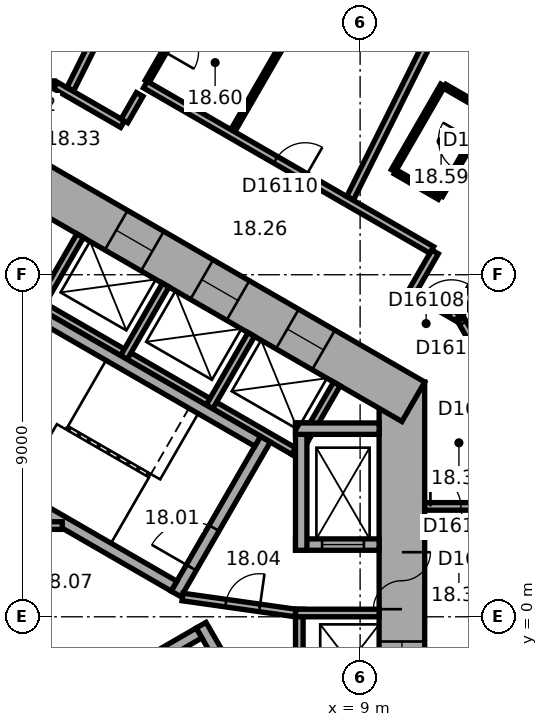
"""IFC4 building model, lengths in metres.
Left out: names, types, materials, properties, quantities, classifications, styles, units other than length and angle.
Written with IfcOpenShell. Run it as: python <this file> out.ifc"""

import sys

from ifc_helpers import new_model, si_unit, direction, frame, frame_2d, origin, place, context, subcontext, project, spatial, rectangle, extrude, element, fill, save


model = new_model("IFC4")
c1 = context("Model", 3, precision=1e-05, world=origin(), true_north=direction((0.0, 1.0)))
c2 = subcontext(c1, "Body", "Model", "MODEL_VIEW")
j1 = project(units=[si_unit("LENGTHUNIT", "METRE"), si_unit("PLANEANGLEUNIT", "RADIAN")], contexts=[c1])
p1 = place(None, origin())
s1 = spatial("IfcSite", under=j1, at=p1, CompositionType="ELEMENT")
p2 = place(p1, origin())
s2 = spatial("IfcBuilding", under=s1, at=p2, CompositionType="ELEMENT")
p3 = place(p2, frame((0.0, 0.0, 83.6)))
s3 = spatial("IfcBuildingStorey", under=s2, at=p3, CompositionType="ELEMENT", Elevation=83.6)
p4 = place(p3, frame((10.1, -6.177, 0.0), z_axis=(0.0, 0.0, 1.0), x_axis=(0.0, 1.0, 0.0)))
e1 = element("IfcWall", 1, at=p4, inside=s3, PredefinedType="SHEAR", context=c2, shape_type="SweptSolid", body=[
    extrude(rectangle(XDim=12.355, YDim=1.2, at=frame_2d((6.177, 0.0))), origin(), (0.0, 0.0, 1.0), 3.3),
])
p5 = place(p4, frame((6.378, 0.0, 0.0)))
e2 = element("IfcOpeningElement", 2, at=p5, cuts=e1, PredefinedType="OPENING", context=c2, shape_type="SweptSolid", body=[
    extrude(rectangle(XDim=1.5, YDim=2.1, at=frame_2d((0.75, 1.05))), frame((0.0, 0.61, 0.0), z_axis=(0.0, -1.0, 0.0), x_axis=(1.0, 0.0, 0.0)), (0.0, 0.0, 1.0), 1.22),
])
p6 = place(p4, frame((1.828, 0.0, 0.0)))
e3 = element("IfcOpeningElement", 3, at=p6, cuts=e1, PredefinedType="OPENING", context=c2, shape_type="SweptSolid", body=[
    extrude(rectangle(XDim=1.1, YDim=2.1, at=frame_2d((0.55, 1.05))), frame((0.0, 0.61, 0.0), z_axis=(0.0, -1.0, 0.0), x_axis=(1.0, 0.0, 0.0)), (0.0, 0.0, 1.0), 1.22),
])
p7 = place(p4, frame((4.427, 0.0, 0.0)))
e4 = element("IfcOpeningElement", 4, at=p7, cuts=e1, PredefinedType="OPENING", context=c2, shape_type="SweptSolid", body=[
    extrude(rectangle(XDim=1.1, YDim=2.1, at=frame_2d((0.55, 1.05))), frame((0.0, 0.61, 0.0), z_axis=(0.0, -1.0, 0.0), x_axis=(1.0, 0.0, 0.0)), (0.0, 0.0, 1.0), 1.22),
])
p8 = place(p3, frame((10.4, 5.658, 0.0), z_axis=(0.0, 0.0, 1.0), x_axis=(-0.866021384402, 0.500006961711, 0.0)))
e5 = element("IfcWall", 5, at=p8, inside=s3, PredefinedType="SHEAR", context=c2, shape_type="SweptSolid", body=[
    extrude(rectangle(XDim=12.355, YDim=1.2, at=frame_2d((6.178, 0.0))), origin(), (0.0, 0.0, 1.0), 3.3),
])
p9 = place(p8, frame((2.728, 0.0, 0.0)))
e6 = element("IfcOpeningElement", 6, at=p9, cuts=e5, PredefinedType="OPENING", context=c2, shape_type="SweptSolid", body=[
    extrude(rectangle(XDim=1.1, YDim=2.1, at=frame_2d((0.55, 1.05))), frame((0.0, 0.61, 0.0), z_axis=(0.0, -1.0, 0.0), x_axis=(1.0, 0.0, 0.0)), (0.0, 0.0, 1.0), 1.22),
])
p10 = place(p8, frame((5.328, 0.0, 0.0)))
e7 = element("IfcOpeningElement", 7, at=p10, cuts=e5, PredefinedType="OPENING", context=c2, shape_type="SweptSolid", body=[
    extrude(rectangle(XDim=1.1, YDim=2.1, at=frame_2d((0.55, 1.05))), frame((0.0, 0.61, 0.0), z_axis=(0.0, -1.0, 0.0), x_axis=(1.0, 0.0, 0.0)), (0.0, 0.0, 1.0), 1.22),
])
p11 = place(p8, frame((7.928, 0.0, 0.0)))
e8 = element("IfcOpeningElement", 8, at=p11, cuts=e5, PredefinedType="OPENING", context=c2, shape_type="SweptSolid", body=[
    extrude(rectangle(XDim=1.1, YDim=2.1, at=frame_2d((0.55, 1.05))), frame((0.0, 0.61, 0.0), z_axis=(0.0, -1.0, 0.0), x_axis=(1.0, 0.0, 0.0)), (0.0, 0.0, 1.0), 1.22),
])
p12 = place(p3, frame((7.4, -5.2, 0.0), z_axis=(0.0, 0.0, 1.0), x_axis=(0.0, 1.0, 0.0)))
e9 = element("IfcWall", 9, at=p12, inside=s3, PredefinedType="PARTITIONING", context=c2, shape_type="SweptSolid", body=[
    extrude(rectangle(XDim=5.4, YDim=0.2, at=frame_2d((2.7, 0.0))), origin(), (0.0, 0.0, 1.0), 3.05),
])
p13 = place(p3, frame((7.3, 0.1, 0.0), z_axis=(0.0, 0.0, 1.0), x_axis=(1.0, 0.0, 0.0)))
e10 = element("IfcWall", 10, at=p13, inside=s3, PredefinedType="PARTITIONING", context=c2, shape_type="SweptSolid", body=[
    extrude(rectangle(XDim=2.2, YDim=0.2, at=frame_2d((1.1, 0.0))), origin(), (0.0, 0.0, 1.0), 3.05),
])
p14 = place(p3, frame((7.424, 4.259, 0.0), z_axis=(0.0, 0.0, 1.0), x_axis=(-0.866026010844, 0.49999894854, 0.0)))
e11 = element("IfcWall", 11, at=p14, inside=s3, PredefinedType="PARTITIONING", context=c2, shape_type="SweptSolid", body=[
    extrude(rectangle(XDim=8.0, YDim=0.2, at=frame_2d((4.0, 0.0))), origin(), (0.0, 0.0, 1.0), 3.05),
])
for number, where, z_axis, x_axis in (
    (12, (7.287, 4.222, 0.0), (0.0, 0.0, 1.0), (0.5, 0.866, 0.0)),
    (13, (5.036, 5.522, 0.0), (0.0, 0.0, 1.0), (0.5, 0.866, 0.0)),
    (14, (2.784, 6.822, 0.0), (0.0, 0.0, 1.0), (0.5, 0.866, 0.0)),
    (15, (0.532, 8.122, 0.0), (0.0, 0.0, 1.0), (0.5, 0.866, 0.0)),
):
    element("IfcWall", number, at=place(p3, frame(where, z_axis=z_axis, x_axis=x_axis)), inside=s3, PredefinedType="PARTITIONING", context=c2, shape_type="SweptSolid", body=[
        extrude(rectangle(XDim=2.2, YDim=0.2, at=frame_2d((1.1, 0.0))), origin(), (0.0, 0.0, 1.0), 3.05),
    ])
p15 = place(p3, frame((4.158, 0.602, 0.0), z_axis=(0.0, 0.0, 1.0), x_axis=(0.499977259774, 0.866038532462, 0.0)))
e16 = element("IfcWall", 16, at=p15, inside=s3, PredefinedType="SHEAR", context=c2, shape_type="SweptSolid", body=[
    extrude(rectangle(XDim=4.7, YDim=0.3, at=frame_2d((2.35, 0.0))), origin(), (0.0, 0.0, 1.0), 3.05),
])
p16 = place(p15, frame((0.8, 0.0, 0.0)))
e17 = element("IfcOpeningElement", 17, at=p16, cuts=e16, PredefinedType="OPENING", context=c2, shape_type="SweptSolid", body=[
    extrude(rectangle(XDim=1.2, YDim=2.1, at=frame_2d((0.6, 1.05))), frame((0.0, 0.16, 0.0), z_axis=(0.0, -1.0, 0.0), x_axis=(1.0, 0.0, 0.0)), (0.0, 0.0, 1.0), 0.32),
])
for number, where, z_axis, x_axis in (
    (18, (4.103, 0.807, 0.0), (0.0, 0.0, 1.0), (-0.866, 0.5, 0.0)),
    (19, (6.303, 4.617, 0.0), (0.0, 0.0, 1.0), (-0.866, 0.5, 0.0)),
):
    element("IfcWall", number, at=place(p3, frame(where, z_axis=z_axis, x_axis=x_axis)), inside=s3, PredefinedType="SHEAR", context=c2, shape_type="SweptSolid", body=[
        extrude(rectangle(XDim=7.06, YDim=0.3, at=frame_2d((3.53, 0.0))), origin(), (0.0, 0.0, 1.0), 3.05),
    ])
p17 = place(p3, frame((4.816, -0.222, 0.0), z_axis=(0.0, 0.0, 1.0), x_axis=(0.499977259774, -0.866038532462, 0.0)))
e20 = element("IfcWall", 20, at=p17, inside=s3, PredefinedType="SHEAR", context=c2, shape_type="SweptSolid", body=[
    extrude(rectangle(XDim=4.7, YDim=0.3, at=frame_2d((2.35, 0.0))), origin(), (0.0, 0.0, 1.0), 3.05),
])
p18 = place(p3, frame((-1.353, -3.957, 0.0), z_axis=(0.0, 0.0, 1.0), x_axis=(0.866027801685, 0.499995846692, 0.0)))
e21 = element("IfcWall", 21, at=p18, inside=s3, PredefinedType="SHEAR", context=c2, shape_type="SweptSolid", body=[
    extrude(rectangle(XDim=7.06, YDim=0.3, at=frame_2d((3.53, 0.0))), origin(), (0.0, 0.0, 1.0), 3.05),
])
p19 = place(p3, frame((7.3, 1.9, 0.0), z_axis=(0.0, 0.0, 1.0), x_axis=(1.0, 0.0, 0.0)))
e22 = element("IfcWall", 22, at=p19, inside=s3, PredefinedType="SHEAR", context=c2, shape_type="SweptSolid", body=[
    extrude(rectangle(XDim=2.2, YDim=0.3, at=frame_2d((1.1, 0.0))), origin(), (0.0, 0.0, 1.0), 3.05),
])
p20 = place(p19, frame((0.7, 0.0, 0.0)))
e23 = element("IfcOpeningElement", 23, at=p20, cuts=e22, PredefinedType="OPENING", context=c2, shape_type="SweptSolid", body=[
    extrude(rectangle(XDim=1.1, YDim=2.1, at=frame_2d((0.55, 1.05))), frame((0.0, 0.16, 0.0), z_axis=(0.0, -1.0, 0.0), x_axis=(1.0, 0.0, 0.0)), (0.0, 0.0, 1.0), 0.32),
])
p21 = place(p3, frame((7.45, 1.75, 0.0), z_axis=(0.0, 0.0, 1.0), x_axis=(0.0, 1.0, 0.0)))
e24 = element("IfcWall", 24, at=p21, inside=s3, PredefinedType="SHEAR", context=c2, shape_type="SweptSolid", body=[
    extrude(rectangle(XDim=3.35, YDim=0.3, at=frame_2d((1.675, 0.0))), origin(), (0.0, 0.0, 1.0), 3.05),
])
p22 = place(p3, frame((7.3, 4.95, 0.0), z_axis=(0.0, 0.0, 1.0), x_axis=(1.0, 0.0, 0.0)))
e25 = element("IfcWall", 25, at=p22, inside=s3, PredefinedType="SHEAR", context=c2, shape_type="SweptSolid", body=[
    extrude(rectangle(XDim=2.2, YDim=0.3, at=frame_2d((1.1, 0.0))), origin(), (0.0, 0.0, 1.0), 3.05),
])
p23 = place(p3, frame((4.327, 0.521, 0.0), z_axis=(0.0, 0.0, 1.0), x_axis=(0.990124376366, -0.14019172346, 0.0)))
e26 = element("IfcWall", 26, at=p23, inside=s3, PredefinedType="PARTITIONING", context=c2, shape_type="SweptSolid", body=[
    extrude(rectangle(XDim=3.002, YDim=0.2, at=frame_2d((1.501, 0.0))), origin(), (0.0, 0.0, 1.0), 3.05),
])
p24 = place(p23, frame((1.15, 0.0, 0.0)))
e27 = element("IfcOpeningElement", 27, at=p24, cuts=e26, PredefinedType="OPENING", context=c2, shape_type="SweptSolid", body=[
    extrude(rectangle(XDim=0.9, YDim=2.1, at=frame_2d((0.45, 1.05))), frame((0.0, 0.11, 0.0), z_axis=(0.0, -1.0, 0.0), x_axis=(1.0, 0.0, 0.0)), (0.0, 0.0, 1.0), 0.22),
])
p25 = place(p3, frame((-2.72, 2.4, 0.0), z_axis=(0.0, 0.0, 1.0), x_axis=(1.0, 0.0, 0.0)))
e28 = element("IfcWall", 28, at=p25, inside=s3, PredefinedType="PARTITIONING", context=c2, shape_type="SweptSolid", body=[
    extrude(rectangle(XDim=3.883, YDim=0.2, at=frame_2d((1.941, 0.0))), origin(), (0.0, 0.0, 1.0), 3.05),
])
p26 = place(p3, frame((0.95, 14.001, 0.0), z_axis=(0.0, 0.0, 1.0), x_axis=(-1.0, 0.0, 0.0)))
e29 = element("IfcWall", 29, at=p26, inside=s3, PredefinedType="PARTITIONING", context=c2, shape_type="SweptSolid", body=[
    extrude(rectangle(XDim=1.86, YDim=0.2, at=frame_2d((0.93, 0.0))), origin(), (0.0, 0.0, 1.0), 3.05),
])
p27 = place(p26, frame((0.48, 0.0, 0.0)))
e30 = element("IfcOpeningElement", 30, at=p27, cuts=e29, PredefinedType="OPENING", context=c2, shape_type="SweptSolid", body=[
    extrude(rectangle(XDim=0.9, YDim=2.1, at=frame_2d((0.45, 1.05))), frame((0.0, 0.11, 0.0), z_axis=(0.0, -1.0, 0.0), x_axis=(1.0, 0.0, 0.0)), (0.0, 0.0, 1.0), 0.22),
])
p28 = place(p3, frame((2.748, 12.962, 0.0), z_axis=(0.0, 0.0, 1.0), x_axis=(-0.866013897511, 0.50001992892, 0.0)))
e31 = element("IfcWall", 31, at=p28, inside=s3, PredefinedType="PARTITIONING", context=c2, shape_type="SweptSolid", body=[
    extrude(rectangle(XDim=2.037, YDim=0.2, at=frame_2d((1.018, 0.0))), origin(), (0.0, 0.0, 1.0), 3.05),
])
p29 = place(p3, frame((3.199, 13.743, 0.0), z_axis=(0.0, 0.0, 1.0), x_axis=(-0.500170954823, -0.865926680471, 0.0)))
e32 = element("IfcWall", 32, at=p29, inside=s3, PredefinedType="PARTITIONING", context=c2, shape_type="SweptSolid", body=[
    extrude(rectangle(XDim=0.801, YDim=0.2, at=frame_2d((0.4, 0.0))), origin(), (0.0, 0.0, 1.0), 3.05),
])
p30 = place(p3, frame((3.399, 14.089, 0.0), z_axis=(0.0, 0.0, 1.0), x_axis=(0.4999416173, 0.866059108428, 0.0)))
e33 = element("IfcWall", 33, at=p30, inside=s3, PredefinedType="PARTITIONING", context=c2, shape_type="SweptSolid", body=[
    extrude(rectangle(XDim=2.7, YDim=0.12, at=frame_2d((1.35, 0.0))), origin(), (0.0, 0.0, 1.0), 3.05),
])
p31 = place(p30, frame((0.9, 0.0, 0.0)))
e34 = element("IfcOpeningElement", 34, at=p31, cuts=e33, PredefinedType="OPENING", context=c2, shape_type="SweptSolid", body=[
    extrude(rectangle(XDim=0.9, YDim=2.1, at=frame_2d((0.45, 1.05))), frame((0.0, 0.07, 0.0), z_axis=(0.0, -1.0, 0.0), x_axis=(1.0, 0.0, 0.0)), (0.0, 0.0, 1.0), 0.14),
])
p32 = place(p3, frame((5.351, 21.859, 0.0), z_axis=(0.0, 0.0, 1.0), x_axis=(-0.446205309328, -0.894930624086, 0.0)))
e35 = element("IfcWall", 35, at=p32, inside=s3, PredefinedType="PARTITIONING", context=c2, shape_type="SweptSolid", body=[
    extrude(rectangle(XDim=8.913, YDim=0.2, at=frame_2d((4.457, 0.0))), origin(), (0.0, 0.0, 1.0), 2.6),
])
p33 = place(p3, frame((6.971, 15.075, 0.0), z_axis=(0.0, 0.0, 1.0), x_axis=(-0.500007957085, -0.86602080971, 0.0)))
e36 = element("IfcWall", 36, at=p33, inside=s3, PredefinedType="PARTITIONING", context=c2, shape_type="SweptSolid", body=[
    extrude(rectangle(XDim=2.64, YDim=0.12, at=frame_2d((1.32, 0.0))), origin(), (0.0, 0.0, 1.0), 3.05),
])
p34 = place(p3, frame((9.875, 11.736, 0.0), z_axis=(0.0, 0.0, 1.0), x_axis=(0.499936506574, 0.866062058628, 0.0)))
e37 = element("IfcWall", 37, at=p34, inside=s3, PredefinedType="PARTITIONING", context=c2, shape_type="SweptSolid", body=[
    extrude(rectangle(XDim=2.6, YDim=0.12, at=frame_2d((1.3, 0.0))), origin(), (0.0, 0.0, 1.0), 3.05),
])
p35 = place(p3, frame((10.371, 8.561, 0.0), z_axis=(0.0, 0.0, 1.0), x_axis=(0.499986357472, 0.866033280158, 0.0)))
e38 = element("IfcWall", 38, at=p35, inside=s3, PredefinedType="PARTITIONING", context=c2, shape_type="SweptSolid", body=[
    extrude(rectangle(XDim=1.201, YDim=0.2, at=frame_2d((0.601, 0.0))), origin(), (0.0, 0.0, 1.0), 3.05),
])
p36 = place(p3, frame((10.885, 9.652, 0.0), z_axis=(0.0, 0.0, 1.0), x_axis=(-0.866033277307, 0.499986362411, 0.0)))
e39 = element("IfcWall", 39, at=p36, inside=s3, PredefinedType="PARTITIONING", context=c2, shape_type="SweptSolid", body=[
    extrude(rectangle(XDim=8.702, YDim=0.2, at=frame_2d((4.351, 0.0))), origin(), (0.0, 0.0, 1.0), 3.05),
])
p37 = place(p36, frame((3.844, 0.0, 0.0)))
e40 = element("IfcOpeningElement", 40, at=p37, cuts=e39, PredefinedType="OPENING", context=c2, shape_type="SweptSolid", body=[
    extrude(rectangle(XDim=0.9, YDim=2.1, at=frame_2d((0.45, 1.05))), frame((0.0, 0.11, 0.0), z_axis=(0.0, -1.0, 0.0), x_axis=(1.0, 0.0, 0.0)), (0.0, 0.0, 1.0), 0.22),
])
for number, where, z_axis, x_axis in (
    (41, (11.087, 11.036, 0.0), (0.0, 0.0, 1.0), (-0.866, 0.5, 0.0)),
    (42, (11.226, 13.958, 0.0), (0.0, 0.0, 1.0), (0.866, -0.5, 0.0)),
):
    element("IfcWall", number, at=place(p3, frame(where, z_axis=z_axis, x_axis=x_axis)), inside=s3, PredefinedType="PARTITIONING", context=c2, shape_type="SweptSolid", body=[
        extrude(rectangle(XDim=1.34, YDim=0.12, at=frame_2d((0.67, 0.0))), origin(), (0.0, 0.0, 1.0), 3.05),
    ])
p38 = place(p3, frame((11.566, 7.871, 0.0), z_axis=(0.0, 0.0, 1.0), x_axis=(-0.866004557827, 0.500036104519, 0.0)))
e43 = element("IfcWall", 43, at=p38, inside=s3, PredefinedType="PARTITIONING", context=c2, shape_type="SweptSolid", body=[
    extrude(rectangle(XDim=1.28, YDim=0.2, at=frame_2d((0.64, 0.0))), origin(), (0.0, 0.0, 1.0), 3.05),
])
p39 = place(p38, frame((0.19, 0.0, 0.0)))
e44 = element("IfcOpeningElement", 44, at=p39, cuts=e43, PredefinedType="OPENING", context=c2, shape_type="SweptSolid", body=[
    extrude(rectangle(XDim=0.9, YDim=2.1, at=frame_2d((0.45, 1.05))), frame((0.0, 0.11, 0.0), z_axis=(0.0, -1.0, 0.0), x_axis=(1.0, 0.0, 0.0)), (0.0, 0.0, 1.0), 0.22),
])
p40 = place(p3, frame((12.357, 13.236, 0.0), z_axis=(0.0, 0.0, 1.0), x_axis=(-0.50000366821, -0.866023285932, 0.0)))
e45 = element("IfcWall", 45, at=p40, inside=s3, PredefinedType="PARTITIONING", context=c2, shape_type="SweptSolid", body=[
    extrude(rectangle(XDim=2.48, YDim=0.12, at=frame_2d((1.24, 0.0))), origin(), (0.0, 0.0, 1.0), 3.05),
])
p41 = place(p40, frame((0.79, 0.0, 0.0)))
e46 = element("IfcOpeningElement", 46, at=p41, cuts=e45, PredefinedType="OPENING", context=c2, shape_type="SweptSolid", body=[
    extrude(rectangle(XDim=0.9, YDim=2.1, at=frame_2d((0.45, 1.05))), frame((0.0, 0.07, 0.0), z_axis=(0.0, -1.0, 0.0), x_axis=(1.0, 0.0, 0.0)), (0.0, 0.0, 1.0), 0.14),
])
p42 = place(p3, frame((12.393, 18.348, 0.0), z_axis=(0.0, 0.0, 1.0), x_axis=(-0.446176022699, -0.894945225569, 0.0)))
e47 = element("IfcWall", 47, at=p42, inside=s3, PredefinedType="PARTITIONING", context=c2, shape_type="SweptSolid", body=[
    extrude(rectangle(XDim=8.191, YDim=0.2, at=frame_2d((4.095, 0.0))), origin(), (0.0, 0.0, 1.0), 2.6),
])
p43 = place(p3, frame((12.58, 6.212, 0.0), z_axis=(0.0, 0.0, 1.0), x_axis=(-0.500063286585, 0.865988862174, 0.0)))
e48 = element("IfcWall", 48, at=p43, inside=s3, PredefinedType="PARTITIONING", context=c2, shape_type="SweptSolid", body=[
    extrude(rectangle(XDim=1.86, YDim=0.2, at=frame_2d((0.93, 0.0))), origin(), (0.0, 0.0, 1.0), 3.05),
])
p44 = place(p43, frame((0.842, 0.0, 0.0)))
e49 = element("IfcOpeningElement", 49, at=p44, cuts=e48, PredefinedType="OPENING", context=c2, shape_type="SweptSolid", body=[
    extrude(rectangle(XDim=0.9, YDim=2.1, at=frame_2d((0.45, 1.05))), frame((0.0, 0.11, 0.0), z_axis=(0.0, -1.0, 0.0), x_axis=(1.0, 0.0, 0.0)), (0.0, 0.0, 1.0), 0.22),
])
p45 = place(p3, frame((15.915, 16.592, 0.0), z_axis=(0.0, 0.0, 1.0), x_axis=(-0.446199736347, -0.894933402709, 0.0)))
e50 = element("IfcWall", 50, at=p45, inside=s3, PredefinedType="PARTITIONING", context=c2, shape_type="SweptSolid", body=[
    extrude(rectangle(XDim=9.635, YDim=0.2, at=frame_2d((4.817, 0.0))), origin(), (0.0, 0.0, 1.0), 3.05),
])
p46 = place(p3, frame((21.95, 2.905, 0.0), z_axis=(0.0, 0.0, 1.0), x_axis=(-1.0, 0.0, 0.0)))
e51 = element("IfcWall", 51, at=p46, inside=s3, PredefinedType="PARTITIONING", context=c2, shape_type="SweptSolid", body=[
    extrude(rectangle(XDim=11.25, YDim=0.2, at=frame_2d((5.625, 0.0))), origin(), (0.0, 0.0, 1.0), 3.05),
])
p47 = place(p46, frame((9.5, 0.0, 0.0)))
e52 = element("IfcOpeningElement", 52, at=p47, cuts=e51, PredefinedType="OPENING", context=c2, shape_type="SweptSolid", body=[
    extrude(rectangle(XDim=1.6, YDim=2.1, at=frame_2d((0.8, 1.05))), frame((0.0, 0.11, 0.0), z_axis=(0.0, -1.0, 0.0), x_axis=(1.0, 0.0, 0.0)), (0.0, 0.0, 1.0), 0.22),
])
p48 = place(p5, origin())
e53 = element("IfcDoor", 53, at=p48, inside=s3, OperationType="DOUBLE_DOOR_SINGLE_SWING", PredefinedType="DOOR", context=c2, shape_type="SweptSolid", body=[
    extrude(rectangle(XDim=1.5, YDim=2.1, at=frame_2d((0.75, 1.05))), frame((0.0, 0.025, 0.0), z_axis=(0.0, -1.0, 0.0), x_axis=(1.0, 0.0, 0.0)), (0.0, 0.0, 1.0), 0.05),
])
fill(e2, e53)
p49 = place(p16, origin())
e54 = element("IfcDoor", 54, at=p49, inside=s3, OperationType="SINGLE_SWING_RIGHT", PredefinedType="DOOR", context=c2, shape_type="SweptSolid", body=[
    extrude(rectangle(XDim=1.2, YDim=2.1, at=frame_2d((0.6, 1.05))), frame((0.0, 0.025, 0.0), z_axis=(0.0, -1.0, 0.0), x_axis=(1.0, 0.0, 0.0)), (0.0, 0.0, 1.0), 0.05),
])
fill(e17, e54)
p50 = place(p24, origin())
e55 = element("IfcDoor", 55, at=p50, inside=s3, OperationType="SINGLE_SWING_LEFT", PredefinedType="DOOR", context=c2, shape_type="SweptSolid", body=[
    extrude(rectangle(XDim=0.9, YDim=2.1, at=frame_2d((0.45, 1.05))), frame((0.0, 0.025, 0.0), z_axis=(0.0, -1.0, 0.0), x_axis=(1.0, 0.0, 0.0)), (0.0, 0.0, 1.0), 0.05),
])
fill(e27, e55)
p51 = place(p20, origin())
e56 = element("IfcDoor", 56, at=p51, inside=s3, OperationType="DOUBLE_DOOR_SLIDING", PredefinedType="DOOR", context=c2, shape_type="SweptSolid", body=[
    extrude(rectangle(XDim=1.1, YDim=2.1, at=frame_2d((0.55, 1.05))), frame((0.0, 0.025, 0.0), z_axis=(0.0, -1.0, 0.0), x_axis=(1.0, 0.0, 0.0)), (0.0, 0.0, 1.0), 0.05),
])
fill(e23, e56)
p52 = place(p7, origin())
e57 = element("IfcDoor", 57, at=p52, inside=s3, OperationType="DOUBLE_DOOR_SLIDING", PredefinedType="DOOR", context=c2, shape_type="SweptSolid", body=[
    extrude(rectangle(XDim=1.1, YDim=2.1, at=frame_2d((0.55, 1.05))), frame((0.0, 0.025, 0.0), z_axis=(0.0, -1.0, 0.0), x_axis=(1.0, 0.0, 0.0)), (0.0, 0.0, 1.0), 0.05),
])
fill(e4, e57)
p53 = place(p9, origin())
e58 = element("IfcDoor", 58, at=p53, inside=s3, OperationType="DOUBLE_DOOR_SLIDING", PredefinedType="DOOR", context=c2, shape_type="SweptSolid", body=[
    extrude(rectangle(XDim=1.1, YDim=2.1, at=frame_2d((0.55, 1.05))), frame((0.0, 0.025, 0.0), z_axis=(0.0, -1.0, 0.0), x_axis=(1.0, 0.0, 0.0)), (0.0, 0.0, 1.0), 0.05),
])
fill(e6, e58)
p54 = place(p10, origin())
e59 = element("IfcDoor", 59, at=p54, inside=s3, OperationType="DOUBLE_DOOR_SLIDING", PredefinedType="DOOR", context=c2, shape_type="SweptSolid", body=[
    extrude(rectangle(XDim=1.1, YDim=2.1, at=frame_2d((0.55, 1.05))), frame((0.0, 0.025, 0.0), z_axis=(0.0, -1.0, 0.0), x_axis=(1.0, 0.0, 0.0)), (0.0, 0.0, 1.0), 0.05),
])
fill(e7, e59)
p55 = place(p11, origin())
e60 = element("IfcDoor", 60, at=p55, inside=s3, OperationType="DOUBLE_DOOR_SLIDING", PredefinedType="DOOR", context=c2, shape_type="SweptSolid", body=[
    extrude(rectangle(XDim=1.1, YDim=2.1, at=frame_2d((0.55, 1.05))), frame((0.0, 0.025, 0.0), z_axis=(0.0, -1.0, 0.0), x_axis=(1.0, 0.0, 0.0)), (0.0, 0.0, 1.0), 0.05),
])
fill(e8, e60)
p56 = place(p44, origin())
e61 = element("IfcDoor", 61, at=p56, inside=s3, OperationType="SINGLE_SWING_LEFT", PredefinedType="DOOR", context=c2, shape_type="SweptSolid", body=[
    extrude(rectangle(XDim=0.9, YDim=2.1, at=frame_2d((0.45, 1.05))), frame((0.0, 0.025, 0.0), z_axis=(0.0, -1.0, 0.0), x_axis=(1.0, 0.0, 0.0)), (0.0, 0.0, 1.0), 0.05),
])
fill(e49, e61)
p57 = place(p39, origin())
e62 = element("IfcDoor", 62, at=p57, inside=s3, OperationType="SINGLE_SWING_LEFT", PredefinedType="DOOR", context=c2, shape_type="SweptSolid", body=[
    extrude(rectangle(XDim=0.9, YDim=2.1, at=frame_2d((0.45, 1.05))), frame((0.0, 0.025, 0.0), z_axis=(0.0, -1.0, 0.0), x_axis=(1.0, 0.0, 0.0)), (0.0, 0.0, 1.0), 0.05),
])
fill(e44, e62)
p58 = place(p41, origin())
e63 = element("IfcDoor", 63, at=p58, inside=s3, OperationType="SINGLE_SWING_LEFT", PredefinedType="DOOR", context=c2, shape_type="SweptSolid", body=[
    extrude(rectangle(XDim=0.9, YDim=2.1, at=frame_2d((0.45, 1.05))), frame((0.0, 0.025, 0.0), z_axis=(0.0, -1.0, 0.0), x_axis=(1.0, 0.0, 0.0)), (0.0, 0.0, 1.0), 0.05),
])
fill(e46, e63)
p59 = place(p37, origin())
e64 = element("IfcDoor", 64, at=p59, inside=s3, OperationType="SINGLE_SWING_LEFT", PredefinedType="DOOR", context=c2, shape_type="SweptSolid", body=[
    extrude(rectangle(XDim=0.9, YDim=2.1, at=frame_2d((0.45, 1.05))), frame((0.0, 0.025, 0.0), z_axis=(0.0, -1.0, 0.0), x_axis=(1.0, 0.0, 0.0)), (0.0, 0.0, 1.0), 0.05),
])
fill(e40, e64)
p60 = place(p31, origin())
e65 = element("IfcDoor", 65, at=p60, inside=s3, OperationType="SINGLE_SWING_LEFT", PredefinedType="DOOR", context=c2, shape_type="SweptSolid", body=[
    extrude(rectangle(XDim=0.9, YDim=2.1, at=frame_2d((0.45, 1.05))), frame((0.0, 0.025, 0.0), z_axis=(0.0, -1.0, 0.0), x_axis=(1.0, 0.0, 0.0)), (0.0, 0.0, 1.0), 0.05),
])
fill(e34, e65)
p61 = place(p47, origin())
e66 = element("IfcDoor", 66, at=p61, inside=s3, OperationType="DOUBLE_DOOR_SINGLE_SWING", PredefinedType="DOOR", context=c2, shape_type="SweptSolid", body=[
    extrude(rectangle(XDim=1.6, YDim=2.1, at=frame_2d((0.8, 1.05))), frame((0.0, 0.025, 0.0), z_axis=(0.0, -1.0, 0.0), x_axis=(1.0, 0.0, 0.0)), (0.0, 0.0, 1.0), 0.05),
])
fill(e52, e66)
save(model, sys.argv[1])
